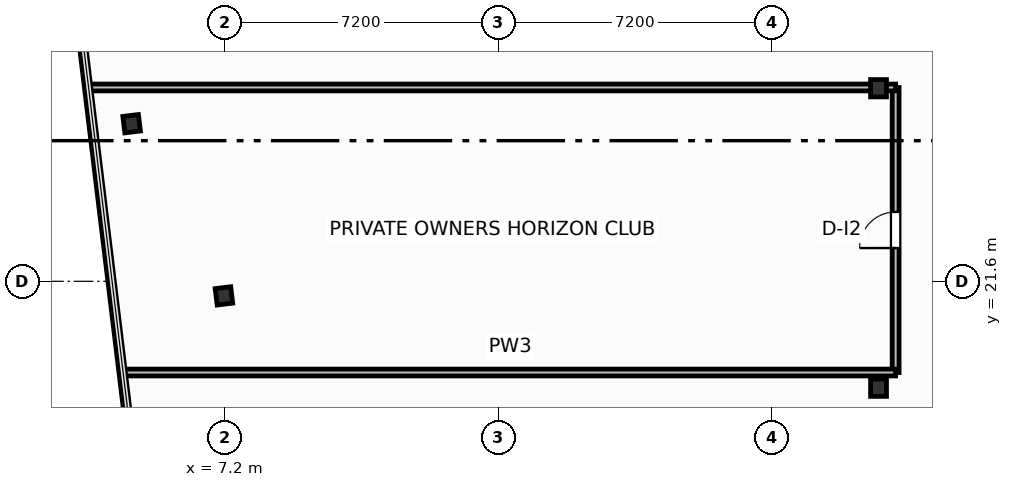
"""IFC4 building model, lengths in metres.
Left out: names, types, materials, properties, quantities, classifications, styles, units other than length and angle.
Written with IfcOpenShell. Run it as: python <this file> out.ifc"""

import sys

from ifc_helpers import new_model, si_unit, direction, frame, frame_2d, origin, origin_2d, place, context, subcontext, project, spatial, rectangle, i_section, extrude, element, fill, save


model = new_model("IFC4")
c1 = context("Model", 3, precision=1e-05, world=origin(), true_north=direction((0.0, 1.0)))
c2 = subcontext(c1, "Body", "Model", "MODEL_VIEW")
j1 = project(units=[si_unit("LENGTHUNIT", "METRE"), si_unit("PLANEANGLEUNIT", "RADIAN")], contexts=[c1])
p1 = place(None, origin())
s1 = spatial("IfcSite", under=j1, at=p1, CompositionType="ELEMENT")
p2 = place(p1, origin())
s2 = spatial("IfcBuilding", under=s1, at=p2, CompositionType="ELEMENT")
p3 = place(p2, frame((0.0, 0.0, 167.2)))
s3 = spatial("IfcBuildingStorey", under=s2, at=p3, CompositionType="ELEMENT", Elevation=167.2)
for number, where, z_axis, x_axis in (
    (1, (24.4, 18.8, 0.0), (0.0, 0.0, 1.0), (1.0, 0.0, 0.0)),
    (2, (24.4, 26.68, 0.0), (0.0, 0.0, 1.0), (1.0, 0.0, 0.0)),
):
    element("IfcColumn", number, at=place(p3, frame(where, z_axis=z_axis, x_axis=x_axis)), inside=s3, PredefinedType="COLUMN", context=c2, shape_type="SweptSolid", body=[
        extrude(i_section(OverallWidth=0.418, OverallDepth=0.455, WebThickness=0.042, FlangeThickness=0.068, FilletRadius=0.025, at=origin_2d()), origin(), (0.0, 0.0, 1.0), 3.7),
    ])
for number, where, z_axis, x_axis in (
    (3, (4.746, 25.747, 0.0), (0.0, 0.0, 1.0), (0.993, 0.12, 0.0)),
    (4, (7.175, 21.216, 0.0), (0.0, 0.0, 1.0), (0.993, 0.12, 0.0)),
):
    element("IfcColumn", number, at=place(p3, frame(where, z_axis=z_axis, x_axis=x_axis)), inside=s3, PredefinedType="COLUMN", context=c2, shape_type="SweptSolid", body=[
        extrude(i_section(OverallWidth=0.412, OverallDepth=0.435, WebThickness=0.036, FlangeThickness=0.057, FilletRadius=0.025, at=origin_2d()), origin(), (0.0, 0.0, 1.0), 3.7),
    ])
p4 = place(p3, frame((24.85, 19.2, 0.0), z_axis=(0.0, 0.0, 1.0), x_axis=(0.0, 1.0, 0.0)))
e5 = element("IfcWall", 5, at=p4, inside=s3, PredefinedType="PARTITIONING", context=c2, shape_type="SweptSolid", body=[
    extrude(rectangle(XDim=7.5, YDim=0.18, at=frame_2d((3.75, 0.0))), origin(), (0.0, 0.0, 1.0), 3.45),
])
p5 = place(p4, frame((3.275, 0.0, 0.0)))
e6 = element("IfcOpeningElement", 6, at=p5, cuts=e5, PredefinedType="OPENING", context=c2, shape_type="SweptSolid", body=[
    extrude(rectangle(XDim=0.95, YDim=2.05, at=frame_2d((0.475, 1.025))), frame((0.0, 0.1, 0.0), z_axis=(0.0, -1.0, 0.0), x_axis=(1.0, 0.0, 0.0)), (0.0, 0.0, 1.0), 0.2),
])
p6 = place(p3, frame((4.562, 19.2, 0.0), z_axis=(0.0, 0.0, 1.0), x_axis=(1.0, 0.0, 0.0)))
e7 = element("IfcWall", 7, at=p6, inside=s3, PredefinedType="PARTITIONING", context=c2, shape_type="SweptSolid", body=[
    extrude(rectangle(XDim=20.288, YDim=0.18, at=frame_2d((10.144, 0.0))), origin(), (0.0, 0.0, 1.0), 3.45),
])
p7 = place(p3, frame((3.653, 26.7, 0.0), z_axis=(0.0, 0.0, 1.0), x_axis=(1.0, 0.0, 0.0)))
e8 = element("IfcWall", 8, at=p7, inside=s3, PredefinedType="PARTITIONING", context=c2, shape_type="SweptSolid", body=[
    extrude(rectangle(XDim=21.197, YDim=0.18, at=frame_2d((10.599, 0.0))), origin(), (0.0, 0.0, 1.0), 2.662),
])
p8 = place(p5, origin())
e9 = element("IfcDoor", 9, at=p8, inside=s3, OperationType="SINGLE_SWING_LEFT", PredefinedType="DOOR", context=c2, shape_type="SweptSolid", body=[
    extrude(rectangle(XDim=0.95, YDim=2.05, at=frame_2d((0.475, 1.025))), frame((0.0, 0.025, 0.0), z_axis=(0.0, -1.0, 0.0), x_axis=(1.0, 0.0, 0.0)), (0.0, 0.0, 1.0), 0.05),
])
fill(e6, e9)
save(model, sys.argv[1])
